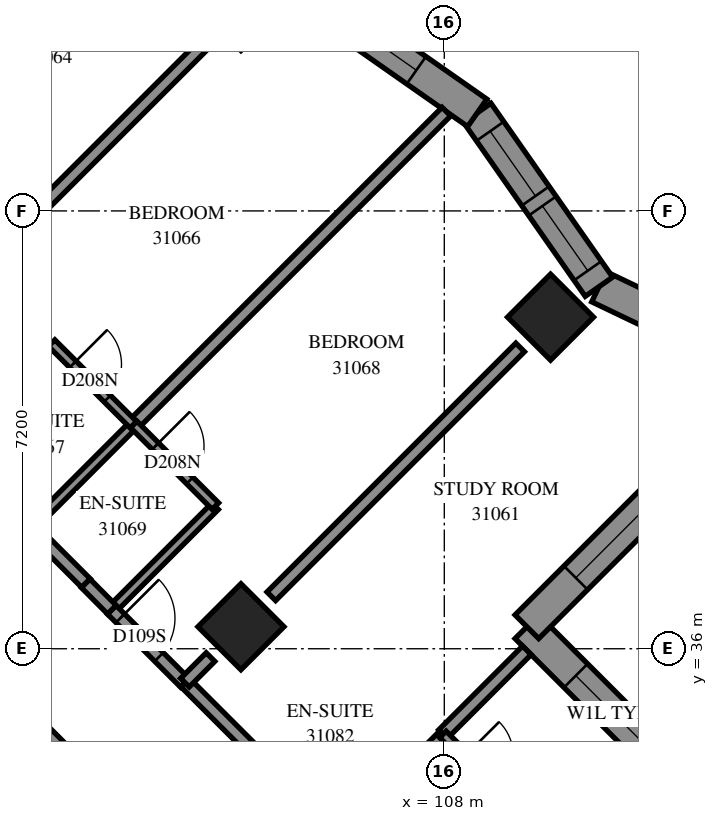
"""IFC4 building model, lengths in metres.
Left out: names, types, materials, properties, quantities, classifications, styles, units other than length and angle.
Written with IfcOpenShell. Run it as: python <this file> out.ifc"""

import sys

from ifc_helpers import new_model, si_unit, direction, frame, frame_2d, origin, origin_2d, place, context, subcontext, project, spatial, polyline, rectangle, outline, extrude, element, fill, save


model = new_model("IFC4")
c1 = context("Model", 3, precision=1e-05, world=origin(), true_north=direction((0.0, 1.0)))
c2 = subcontext(c1, "Body", "Model", "MODEL_VIEW")
j1 = project(units=[si_unit("LENGTHUNIT", "METRE"), si_unit("PLANEANGLEUNIT", "RADIAN")], contexts=[c1])
p1 = place(None, origin())
s1 = spatial("IfcSite", under=j1, at=p1, CompositionType="ELEMENT")
p2 = place(p1, origin())
s2 = spatial("IfcBuilding", under=s1, at=p2, CompositionType="ELEMENT")
p3 = place(p2, frame((0.0, 0.0, 115.2)))
s3 = spatial("IfcBuildingStorey", under=s2, at=p3, CompositionType="ELEMENT", Elevation=115.2)
for number, where, z_axis, x_axis in (
    (1, (109.747, 41.453, 0.0), (0.0, 0.0, 1.0), (0.707, -0.707, 0.0)),
    (2, (104.656, 36.362, 0.0), (0.0, 0.0, 1.0), (0.707, -0.707, 0.0)),
):
    element("IfcColumn", number, at=place(p3, frame(where, z_axis=z_axis, x_axis=x_axis)), inside=s3, PredefinedType="COLUMN", context=c2, shape_type="SweptSolid", body=[
        extrude(rectangle(XDim=1.0, YDim=1.0, at=origin_2d()), origin(), (0.0, 0.0, 1.0), 3.1),
    ])
p4 = place(p3, frame((112.823, 32.897, 0.0), z_axis=(0.0, 0.0, 1.0), x_axis=(-0.7071067812, 0.7071067812, 0.0)))
e3 = element("IfcWall", 3, at=p4, inside=s3, PredefinedType="SOLIDWALL", context=c2, shape_type="SweptSolid", body=[
    extrude(outline(polyline([(-0.174, -0.275), (4.625, -0.275), (5.176, 0.275), (0.174, 0.275), (-0.174, -0.275)])), origin(), (0.0, 0.0, 1.0), 3.1),
])
p5 = place(p4, frame((1.963, 0.0, 0.6)))
e4 = element("IfcOpeningElement", 4, at=p5, cuts=e3, PredefinedType="OPENING", context=c2, shape_type="SweptSolid", body=[
    extrude(rectangle(XDim=1.8, YDim=1.9, at=frame_2d((0.9, 0.95))), frame((0.0, 0.285, 0.0), z_axis=(0.0, -1.0, 0.0), x_axis=(1.0, 0.0, 0.0)), (0.0, 0.0, 1.0), 0.57),
])
p6 = place(p3, frame((109.358, 36.362, 0.0), z_axis=(0.0, 0.0, 1.0), x_axis=(0.7071067812, 0.7071067812, 0.0)))
e5 = element("IfcWall", 5, at=p6, inside=s3, PredefinedType="SOLIDWALL", context=c2, shape_type="SweptSolid", body=[
    extrude(outline(polyline([(0.275, -0.275), (6.278, -0.275), (5.501, 0.275), (-0.275, 0.275), (0.275, -0.275)])), origin(), (0.0, 0.0, 1.0), 3.1),
])
p7 = place(p6, frame((1.137, 0.0, 0.6)))
e6 = element("IfcOpeningElement", 6, at=p7, cuts=e5, PredefinedType="OPENING", context=c2, shape_type="SweptSolid", body=[
    extrude(rectangle(XDim=1.8, YDim=1.9, at=frame_2d((0.9, 0.95))), frame((0.0, 0.285, 0.0), z_axis=(0.0, -1.0, 0.0), x_axis=(1.0, 0.0, 0.0)), (0.0, 0.0, 1.0), 0.57),
])
p8 = place(p6, frame((3.988, 0.0, 0.6)))
e7 = element("IfcOpeningElement", 7, at=p8, cuts=e5, PredefinedType="OPENING", context=c2, shape_type="SweptSolid", body=[
    extrude(rectangle(XDim=1.2, YDim=1.9, at=frame_2d((0.6, 0.95))), frame((0.0, 0.285, 0.0), z_axis=(0.0, -1.0, 0.0), x_axis=(1.0, 0.0, 0.0)), (0.0, 0.0, 1.0), 0.57),
])
p9 = place(p3, frame((113.523, 40.526, 0.0), z_axis=(0.0, 0.0, 1.0), x_axis=(-0.9019138195, 0.431916036, 0.0)))
e8 = element("IfcWall", 8, at=p9, inside=s3, PredefinedType="SOLIDWALL", context=c2, shape_type="SweptSolid", body=[
    extrude(outline(polyline([(-0.389, -0.275), (3.231, -0.275), (3.376, 0.275), (0.389, 0.275), (-0.389, -0.275)])), origin(), (0.0, 0.0, 1.0), 3.1),
])
p10 = place(p9, frame((1.246, 0.0, 0.5)))
e9 = element("IfcOpeningElement", 9, at=p10, cuts=e8, PredefinedType="OPENING", context=c2, shape_type="SweptSolid", body=[
    extrude(rectangle(XDim=1.2, YDim=2.45, at=frame_2d((0.6, 1.225))), frame((0.0, 0.285, 0.0), z_axis=(0.0, -1.0, 0.0), x_axis=(1.0, 0.0, 0.0)), (0.0, 0.0, 1.0), 0.57),
])
p11 = place(p3, frame((110.543, 41.953, 0.0), z_axis=(0.0, 0.0, 1.0), x_axis=(-0.5733354333, 0.8193207436, 0.0)))
e10 = element("IfcWall", 10, at=p11, inside=s3, PredefinedType="SOLIDWALL", context=c2, shape_type="SweptSolid", body=[
    extrude(outline(polyline([(0.072, -0.275), (3.539, -0.275), (3.442, 0.275), (-0.072, 0.275), (0.072, -0.275)])), origin(), (0.0, 0.0, 1.0), 3.1),
])
p12 = place(p11, frame((0.321, 0.0, 0.5)))
e11 = element("IfcOpeningElement", 11, at=p12, cuts=e10, PredefinedType="OPENING", context=c2, shape_type="SweptSolid", body=[
    extrude(rectangle(XDim=1.3, YDim=2.45, at=frame_2d((0.65, 1.225))), frame((0.0, 0.285, 0.0), z_axis=(0.0, -1.0, 0.0), x_axis=(1.0, 0.0, 0.0)), (0.0, 0.0, 1.0), 0.57),
])
p13 = place(p11, frame((1.821, 0.0, 0.5)))
e12 = element("IfcOpeningElement", 12, at=p13, cuts=e10, PredefinedType="OPENING", context=c2, shape_type="SweptSolid", body=[
    extrude(rectangle(XDim=1.3, YDim=2.45, at=frame_2d((0.65, 1.225))), frame((0.0, 0.285, 0.0), z_axis=(0.0, -1.0, 0.0), x_axis=(1.0, 0.0, 0.0)), (0.0, 0.0, 1.0), 0.57),
])
p14 = place(p3, frame((108.542, 44.813, 0.0), z_axis=(0.0, 0.0, 1.0), x_axis=(-0.8193240603, 0.5733306936, 0.0)))
e13 = element("IfcWall", 13, at=p14, inside=s3, PredefinedType="SOLIDWALL", context=c2, shape_type="SweptSolid", body=[
    extrude(outline(polyline([(-0.049, -0.275), (3.418, -0.275), (3.515, 0.275), (0.049, 0.275), (-0.049, -0.275)])), origin(), (0.0, 0.0, 1.0), 3.1),
])
p15 = place(p14, frame((1.222, 0.0, 0.5)))
e14 = element("IfcOpeningElement", 14, at=p15, cuts=e13, PredefinedType="OPENING", context=c2, shape_type="SweptSolid", body=[
    extrude(rectangle(XDim=1.2, YDim=2.45, at=frame_2d((0.6, 1.225))), frame((0.0, 0.285, 0.0), z_axis=(0.0, -1.0, 0.0), x_axis=(1.0, 0.0, 0.0)), (0.0, 0.0, 1.0), 0.57),
])
p16 = place(p3, frame((96.103, 43.083, 0.0), z_axis=(0.0, 0.0, 1.0), x_axis=(0.7071067812, -0.7071067812, 0.0)))
e15 = element("IfcWall", 15, at=p16, inside=s3, PredefinedType="PARTITIONING", context=c2, shape_type="SweptSolid", body=[
    extrude(rectangle(XDim=8.491, YDim=0.2, at=frame_2d((4.245, 0.0))), origin(), (0.0, 0.0, 1.0), 3.1),
])
p17 = place(p16, frame((1.995, 0.0, 0.0)))
e16 = element("IfcOpeningElement", 16, at=p17, cuts=e15, PredefinedType="OPENING", context=c2, shape_type="SweptSolid", body=[
    extrude(rectangle(XDim=0.9, YDim=2.1, at=frame_2d((0.45, 1.05))), frame((0.0, 0.11, 0.0), z_axis=(0.0, -1.0, 0.0), x_axis=(1.0, 0.0, 0.0)), (0.0, 0.0, 1.0), 0.22),
])
p18 = place(p16, frame((4.27, 0.0, 0.0)))
e17 = element("IfcOpeningElement", 17, at=p18, cuts=e15, PredefinedType="OPENING", context=c2, shape_type="SweptSolid", body=[
    extrude(rectangle(XDim=0.9, YDim=2.1, at=frame_2d((0.45, 1.05))), frame((0.0, 0.11, 0.0), z_axis=(0.0, -1.0, 0.0), x_axis=(1.0, 0.0, 0.0)), (0.0, 0.0, 1.0), 0.22),
])
p19 = place(p3, frame((102.888, 39.686, 0.0), z_axis=(0.0, 0.0, 1.0), x_axis=(0.7071067812, 0.7071067812, 0.0)))
e18 = element("IfcWall", 18, at=p19, inside=s3, PredefinedType="PARTITIONING", context=c2, shape_type="SweptSolid", body=[
    extrude(rectangle(XDim=7.278, YDim=0.2, at=frame_2d((3.639, 0.0))), origin(), (0.0, 0.0, 1.0), 3.1),
])
p20 = place(p3, frame((108.831, 30.355, 0.0), z_axis=(0.0, 0.0, 1.0), x_axis=(-0.7073012053, 0.7069123036, 0.0)))
e19 = element("IfcWall", 19, at=p20, inside=s3, PredefinedType="PARTITIONING", context=c2, shape_type="SweptSolid", body=[
    extrude(rectangle(XDim=7.2, YDim=0.2, at=frame_2d((3.6, 0.0))), origin(), (0.0, 0.0, 1.0), 2.6),
])
p21 = place(p20, frame((4.125, 0.0, 0.0)))
e20 = element("IfcOpeningElement", 20, at=p21, cuts=e19, PredefinedType="OPENING", context=c2, shape_type="SweptSolid", body=[
    extrude(rectangle(XDim=1.0, YDim=2.1, at=frame_2d((0.5, 1.05))), frame((0.0, 0.11, 0.0), z_axis=(0.0, -1.0, 0.0), x_axis=(1.0, 0.0, 0.0)), (0.0, 0.0, 1.0), 0.22),
])
p22 = place(p20, frame((0.705, 0.0, 0.0)))
e21 = element("IfcOpeningElement", 21, at=p22, cuts=e19, PredefinedType="OPENING", context=c2, shape_type="SweptSolid", body=[
    extrude(rectangle(XDim=0.9, YDim=2.1, at=frame_2d((0.45, 1.05))), frame((0.0, 0.11, 0.0), z_axis=(0.0, -1.0, 0.0), x_axis=(1.0, 0.0, 0.0)), (0.0, 0.0, 1.0), 0.22),
])
p23 = place(p3, frame((97.795, 44.777, 0.0), z_axis=(0.0, 0.0, 1.0), x_axis=(0.707252317, 0.7069612154, 0.0)))
e22 = element("IfcWall", 22, at=p23, inside=s3, PredefinedType="PARTITIONING", context=c2, shape_type="SweptSolid", body=[
    extrude(rectangle(XDim=7.214, YDim=0.2, at=frame_2d((3.607, 0.0))), origin(), (0.0, 0.0, 1.0), 3.1),
])
for number, where, z_axis, x_axis in (
    (23, (105.155, 36.863, 0.0), (0.0, 0.0, 1.0), (0.707, 0.707, 0.0)),
    (24, (100.063, 41.953, 0.0), (0.0, 0.0, 1.0), (0.707, 0.707, 0.0)),
):
    element("IfcWall", number, at=place(p3, frame(where, z_axis=z_axis, x_axis=x_axis)), inside=s3, PredefinedType="PARTITIONING", context=c2, shape_type="SweptSolid", body=[
        extrude(rectangle(XDim=5.787, YDim=0.2, at=frame_2d((2.893, 0.0))), origin(), (0.0, 0.0, 1.0), 3.1),
    ])
p24 = place(p3, frame((102.533, 36.645, 0.0), z_axis=(0.0, 0.0, 1.0), x_axis=(0.7071067812, 0.7071067812, 0.0)))
e25 = element("IfcWall", 25, at=p24, inside=s3, PredefinedType="PARTITIONING", context=c2, shape_type="SweptSolid", body=[
    extrude(rectangle(XDim=2.401, YDim=0.15, at=frame_2d((1.201, 0.0))), origin(), (0.0, 0.0, 1.0), 3.1),
])
p25 = place(p3, frame((101.192, 37.988, 0.0), z_axis=(0.0, 0.0, 1.0), x_axis=(0.706689978, 0.7075233388, 0.0)))
e26 = element("IfcWall", 26, at=p25, inside=s3, PredefinedType="PARTITIONING", context=c2, shape_type="SweptSolid", body=[
    extrude(rectangle(XDim=2.4, YDim=0.15, at=frame_2d((1.2, 0.0))), origin(), (0.0, 0.0, 1.0), 3.1),
])
for number, where, z_axis, x_axis in (
    (27, (106.283, 32.899, 0.0), (0.0, 0.0, 1.0), (0.707, 0.707, 0.0)),
    (28, (99.847, 39.333, 0.0), (0.0, 0.0, 1.0), (0.707, 0.707, 0.0)),
):
    element("IfcWall", number, at=place(p3, frame(where, z_axis=z_axis, x_axis=x_axis)), inside=s3, PredefinedType="PARTITIONING", context=c2, shape_type="SweptSolid", body=[
        extrude(rectangle(XDim=2.398, YDim=0.15, at=frame_2d((1.199, 0.0))), origin(), (0.0, 0.0, 1.0), 3.1),
    ])
p26 = place(p3, frame((102.891, 39.69, 0.0), z_axis=(0.0, 0.0, 1.0), x_axis=(0.7071067812, -0.7071067812, 0.0)))
e29 = element("IfcWall", 29, at=p26, inside=s3, PredefinedType="PARTITIONING", context=c2, shape_type="SweptSolid", body=[
    extrude(rectangle(XDim=1.901, YDim=0.15, at=frame_2d((0.95, 0.0))), origin(), (0.0, 0.0, 1.0), 3.1),
])
p27 = place(p26, frame((0.505, 0.0, 0.0)))
e30 = element("IfcOpeningElement", 30, at=p27, cuts=e29, PredefinedType="OPENING", context=c2, shape_type="SweptSolid", body=[
    extrude(rectangle(XDim=0.8, YDim=2.1, at=frame_2d((0.4, 1.05))), frame((0.0, 0.085, 0.0), z_axis=(0.0, -1.0, 0.0), x_axis=(1.0, 0.0, 0.0)), (0.0, 0.0, 1.0), 0.17),
])
p28 = place(p3, frame((107.979, 34.595, 0.0), z_axis=(0.0, 0.0, 1.0), x_axis=(0.7071067812, 0.7071067812, 0.0)))
e31 = element("IfcWall", 31, at=p28, inside=s3, PredefinedType="PARTITIONING", context=c2, shape_type="SweptSolid", body=[
    extrude(rectangle(XDim=1.95, YDim=0.2, at=frame_2d((0.975, 0.0))), origin(), (0.0, 0.0, 1.0), 3.1),
])
p29 = place(p3, frame((100.839, 35.231, 0.0), z_axis=(0.0, 0.0, 1.0), x_axis=(0.7065800724, -0.7076330979, 0.0)))
e32 = element("IfcWall", 32, at=p29, inside=s3, PredefinedType="PARTITIONING", context=c2, shape_type="SweptSolid", body=[
    extrude(rectangle(XDim=1.899, YDim=0.2, at=frame_2d((0.95, 0.0))), origin(), (0.0, 0.0, 1.0), 3.1),
])
p30 = place(p3, frame((107.977, 34.591, 0.0), z_axis=(0.0, 0.0, 1.0), x_axis=(0.7065800724, -0.7076330979, 0.0)))
e33 = element("IfcWall", 33, at=p30, inside=s3, PredefinedType="PARTITIONING", context=c2, shape_type="SweptSolid", body=[
    extrude(rectangle(XDim=1.899, YDim=0.15, at=frame_2d((0.95, 0.0))), origin(), (0.0, 0.0, 1.0), 3.1),
])
p31 = place(p30, frame((0.508, 0.0, 0.0)))
e34 = element("IfcOpeningElement", 34, at=p31, cuts=e33, PredefinedType="OPENING", context=c2, shape_type="SweptSolid", body=[
    extrude(rectangle(XDim=0.8, YDim=2.1, at=frame_2d((0.4, 1.05))), frame((0.0, 0.085, 0.0), z_axis=(0.0, -1.0, 0.0), x_axis=(1.0, 0.0, 0.0)), (0.0, 0.0, 1.0), 0.17),
])
p32 = place(p3, frame((101.543, 41.027, 0.0), z_axis=(0.0, 0.0, 1.0), x_axis=(0.7076330979, -0.7065800724, 0.0)))
e35 = element("IfcWall", 35, at=p32, inside=s3, PredefinedType="PARTITIONING", context=c2, shape_type="SweptSolid", body=[
    extrude(rectangle(XDim=1.899, YDim=0.15, at=frame_2d((0.95, 0.0))), origin(), (0.0, 0.0, 1.0), 3.1),
])
p33 = place(p32, frame((0.493, 0.0, 0.0)))
e36 = element("IfcOpeningElement", 36, at=p33, cuts=e35, PredefinedType="OPENING", context=c2, shape_type="SweptSolid", body=[
    extrude(rectangle(XDim=0.8, YDim=2.1, at=frame_2d((0.4, 1.05))), frame((0.0, 0.085, 0.0), z_axis=(0.0, -1.0, 0.0), x_axis=(1.0, 0.0, 0.0)), (0.0, 0.0, 1.0), 0.17),
])
p34 = place(p3, frame((102.531, 36.641, 0.0), z_axis=(0.0, 0.0, 1.0), x_axis=(0.7071067812, -0.7071067812, 0.0)))
e37 = element("IfcWall", 37, at=p34, inside=s3, PredefinedType="PARTITIONING", context=c2, shape_type="SweptSolid", body=[
    extrude(rectangle(XDim=1.7, YDim=0.2, at=frame_2d((0.85, 0.0))), origin(), (0.0, 0.0, 1.0), 3.1),
])
p35 = place(p34, frame((0.198, 0.0, 0.0)))
e38 = element("IfcOpeningElement", 38, at=p35, cuts=e37, PredefinedType="OPENING", context=c2, shape_type="SweptSolid", body=[
    extrude(rectangle(XDim=0.9, YDim=2.1, at=frame_2d((0.45, 1.05))), frame((0.0, 0.11, 0.0), z_axis=(0.0, -1.0, 0.0), x_axis=(1.0, 0.0, 0.0)), (0.0, 0.0, 1.0), 0.22),
])
p36 = place(p3, frame((102.103, 37.075, 0.0), z_axis=(0.0, 0.0, 1.0), x_axis=(0.7054642634, -0.7087454925, 0.0)))
e39 = element("IfcWall", 39, at=p36, inside=s3, PredefinedType="PARTITIONING", context=c2, shape_type="SweptSolid", body=[
    extrude(rectangle(XDim=0.61, YDim=0.2, at=frame_2d((0.305, 0.0))), origin(), (0.0, 0.0, 1.0), 3.1),
])
p37 = place(p3, frame((103.735, 35.443, 0.0), z_axis=(0.0, 0.0, 1.0), x_axis=(0.7071067812, 0.7071067812, 0.0)))
e40 = element("IfcWall", 40, at=p37, inside=s3, PredefinedType="PARTITIONING", context=c2, shape_type="SweptSolid", body=[
    extrude(rectangle(XDim=0.594, YDim=0.2, at=frame_2d((0.297, 0.0))), origin(), (0.0, 0.0, 1.0), 3.1),
])
p38 = place(p5, origin())
e41 = element("IfcWindow", 41, at=p38, inside=s3, PartitioningType="SINGLE_PANEL", PredefinedType="WINDOW", context=c2, shape_type="SweptSolid", body=[
    extrude(rectangle(XDim=1.8, YDim=1.9, at=frame_2d((0.9, 0.95))), frame((0.0, 0.155, 0.0), z_axis=(0.0, -1.0, 0.0), x_axis=(1.0, 0.0, 0.0)), (0.0, 0.0, 1.0), 0.06),
])
fill(e4, e41)
p39 = place(p7, origin())
e42 = element("IfcWindow", 42, at=p39, inside=s3, PartitioningType="SINGLE_PANEL", PredefinedType="WINDOW", context=c2, shape_type="SweptSolid", body=[
    extrude(rectangle(XDim=1.8, YDim=1.9, at=frame_2d((0.9, 0.95))), frame((0.0, 0.155, 0.0), z_axis=(0.0, -1.0, 0.0), x_axis=(1.0, 0.0, 0.0)), (0.0, 0.0, 1.0), 0.06),
])
fill(e6, e42)
p40 = place(p12, origin())
e43 = element("IfcWindow", 43, at=p40, inside=s3, PartitioningType="SINGLE_PANEL", PredefinedType="WINDOW", context=c2, shape_type="SweptSolid", body=[
    extrude(rectangle(XDim=1.3, YDim=2.45, at=frame_2d((0.65, 1.225))), frame((0.0, 0.155, 0.0), z_axis=(0.0, -1.0, 0.0), x_axis=(1.0, 0.0, 0.0)), (0.0, 0.0, 1.0), 0.06),
])
fill(e11, e43)
p41 = place(p13, origin())
e44 = element("IfcWindow", 44, at=p41, inside=s3, PartitioningType="SINGLE_PANEL", PredefinedType="WINDOW", context=c2, shape_type="SweptSolid", body=[
    extrude(rectangle(XDim=1.3, YDim=2.45, at=frame_2d((0.65, 1.225))), frame((0.0, 0.155, 0.0), z_axis=(0.0, -1.0, 0.0), x_axis=(1.0, 0.0, 0.0)), (0.0, 0.0, 1.0), 0.06),
])
fill(e12, e44)
p42 = place(p15, origin())
e45 = element("IfcWindow", 45, at=p42, inside=s3, PartitioningType="SINGLE_PANEL", PredefinedType="WINDOW", context=c2, shape_type="SweptSolid", body=[
    extrude(rectangle(XDim=1.2, YDim=2.45, at=frame_2d((0.6, 1.225))), frame((0.0, 0.155, 0.0), z_axis=(0.0, -1.0, 0.0), x_axis=(1.0, 0.0, 0.0)), (0.0, 0.0, 1.0), 0.06),
])
fill(e14, e45)
p43 = place(p33, origin())
e46 = element("IfcDoor", 46, at=p43, inside=s3, OperationType="SINGLE_SWING_RIGHT", PredefinedType="DOOR", context=c2, shape_type="SweptSolid", body=[
    extrude(rectangle(XDim=0.8, YDim=2.1, at=frame_2d((0.4, 1.05))), frame((0.0, 0.025, 0.0), z_axis=(0.0, -1.0, 0.0), x_axis=(1.0, 0.0, 0.0)), (0.0, 0.0, 1.0), 0.05),
])
fill(e36, e46)
p44 = place(p35, origin())
e47 = element("IfcDoor", 47, at=p44, inside=s3, OperationType="SINGLE_SWING_RIGHT", PredefinedType="DOOR", context=c2, shape_type="SweptSolid", body=[
    extrude(rectangle(XDim=0.9, YDim=2.1, at=frame_2d((0.45, 1.05))), frame((0.0, 0.025, 0.0), z_axis=(0.0, -1.0, 0.0), x_axis=(1.0, 0.0, 0.0)), (0.0, 0.0, 1.0), 0.05),
])
fill(e38, e47)
p45 = place(p27, origin())
e48 = element("IfcDoor", 48, at=p45, inside=s3, OperationType="SINGLE_SWING_RIGHT", PredefinedType="DOOR", context=c2, shape_type="SweptSolid", body=[
    extrude(rectangle(XDim=0.8, YDim=2.1, at=frame_2d((0.4, 1.05))), frame((0.0, 0.025, 0.0), z_axis=(0.0, -1.0, 0.0), x_axis=(1.0, 0.0, 0.0)), (0.0, 0.0, 1.0), 0.05),
])
fill(e30, e48)
save(model, sys.argv[1])
